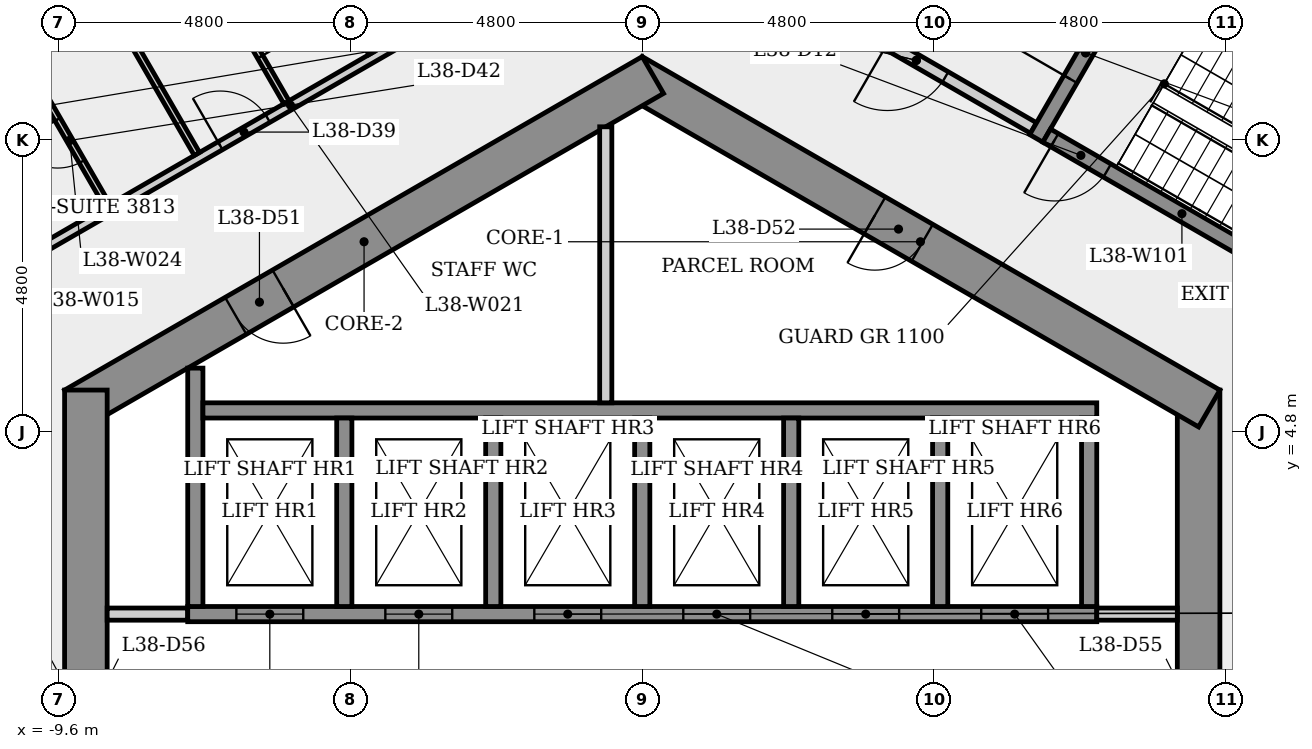
"""IFC4 building model, lengths in metres.
Left out: names, types, materials, properties, quantities, classifications, styles, units other than length and angle.
Written with IfcOpenShell. Run it as: python <this file> out.ifc"""

import sys

from ifc_helpers import new_model, si_unit, direction, frame, frame_2d, origin, place, context, subcontext, project, spatial, rectangle, extrude, element, fill, save


model = new_model("IFC4")
c1 = context("Model", 3, precision=1e-05, world=origin(), true_north=direction((0.0, 1.0)))
c2 = subcontext(c1, "Body", "Model", "MODEL_VIEW")
j1 = project(units=[si_unit("LENGTHUNIT", "METRE"), si_unit("PLANEANGLEUNIT", "RADIAN")], contexts=[c1])
p1 = place(None, origin())
s1 = spatial("IfcSite", under=j1, at=p1, CompositionType="ELEMENT")
p2 = place(p1, origin())
s2 = spatial("IfcBuilding", under=s1, at=p2, CompositionType="ELEMENT")
p3 = place(p2, frame((0.0, 0.0, 143.9)))
s3 = spatial("IfcBuildingStorey", under=s2, at=p3, CompositionType="ELEMENT", Elevation=143.9)
p4 = place(p3, frame((9.15, -5.485, 0.0), z_axis=(0.0, 0.0, 1.0), x_axis=(0.0, 1.0, 0.0)))
e1 = element("IfcWall", 1, at=p4, inside=s3, PredefinedType="SHEAR", context=c2, shape_type="SweptSolid", body=[
    extrude(rectangle(XDim=10.97, YDim=0.7, at=frame_2d((5.485, 0.0))), origin(), (0.0, 0.0, 1.0), 4.0),
])
p5 = place(p4, frame((4.685, 0.0, 0.0)))
e2 = element("IfcOpeningElement", 2, at=p5, cuts=e1, PredefinedType="OPENING", context=c2, shape_type="SweptSolid", body=[
    extrude(rectangle(XDim=1.6, YDim=2.1, at=frame_2d((0.8, 1.05))), frame((0.0, 0.36, 0.0), z_axis=(0.0, -1.0, 0.0), x_axis=(1.0, 0.0, 0.0)), (0.0, 0.0, 1.0), 0.72),
])
p6 = place(p3, frame((9.325, 5.182, 0.0), z_axis=(0.0, 0.0, 1.0), x_axis=(-0.866023993627, 0.500002442456, 0.0)))
e3 = element("IfcWall", 3, at=p6, inside=s3, PredefinedType="SHEAR", context=c2, shape_type="SweptSolid", body=[
    extrude(rectangle(XDim=10.97, YDim=0.7, at=frame_2d((5.485, 0.0))), origin(), (0.0, 0.0, 1.0), 4.0),
])
p7 = place(p6, frame((5.451, 0.0, 0.0)))
e4 = element("IfcOpeningElement", 4, at=p7, cuts=e3, PredefinedType="OPENING", context=c2, shape_type="SweptSolid", body=[
    extrude(rectangle(XDim=0.9, YDim=2.1, at=frame_2d((0.45, 1.05))), frame((0.0, 0.36, 0.0), z_axis=(0.0, -1.0, 0.0), x_axis=(1.0, 0.0, 0.0)), (0.0, 0.0, 1.0), 0.72),
])
p8 = place(p3, frame((0.175, 10.667, 0.0), z_axis=(0.0, 0.0, 1.0), x_axis=(-0.866023993627, -0.500002442456, 0.0)))
e5 = element("IfcWall", 5, at=p8, inside=s3, PredefinedType="SHEAR", context=c2, shape_type="SweptSolid", body=[
    extrude(rectangle(XDim=10.97, YDim=0.7, at=frame_2d((5.485, 0.0))), origin(), (0.0, 0.0, 1.0), 4.0),
])
p9 = place(p8, frame((7.021, 0.0, 0.0)))
e6 = element("IfcOpeningElement", 6, at=p9, cuts=e5, PredefinedType="OPENING", context=c2, shape_type="SweptSolid", body=[
    extrude(rectangle(XDim=0.9, YDim=2.1, at=frame_2d((0.45, 1.05))), frame((0.0, 0.36, 0.0), z_axis=(0.0, -1.0, 0.0), x_axis=(1.0, 0.0, 0.0)), (0.0, 0.0, 1.0), 0.72),
])
p10 = place(p3, frame((-9.15, 5.485, 0.0), z_axis=(0.0, 0.0, 1.0), x_axis=(0.0, -1.0, 0.0)))
e7 = element("IfcWall", 7, at=p10, inside=s3, PredefinedType="SHEAR", context=c2, shape_type="SweptSolid", body=[
    extrude(rectangle(XDim=10.97, YDim=0.7, at=frame_2d((5.485, 0.0))), origin(), (0.0, 0.0, 1.0), 4.0),
])
p11 = place(p10, frame((4.685, 0.0, 0.0)))
e8 = element("IfcOpeningElement", 8, at=p11, cuts=e7, PredefinedType="OPENING", context=c2, shape_type="SweptSolid", body=[
    extrude(rectangle(XDim=1.6, YDim=2.1, at=frame_2d((0.8, 1.05))), frame((0.0, 0.36, 0.0), z_axis=(0.0, -1.0, 0.0), x_axis=(1.0, 0.0, 0.0)), (0.0, 0.0, 1.0), 0.72),
])
p12 = place(p3, frame((-10.094, 7.682, 0.0), z_axis=(0.0, 0.0, 1.0), x_axis=(0.866024204941, 0.500002076452, 0.0)))
e9 = element("IfcWall", 9, at=p12, inside=s3, PredefinedType="PARTITIONING", context=c2, shape_type="SweptSolid", body=[
    extrude(rectangle(XDim=9.951, YDim=0.15, at=frame_2d((4.976, 0.0))), origin(), (0.0, 0.0, 1.0), 3.6),
])
p13 = place(p12, frame((3.642, 0.0, 0.0)))
e10 = element("IfcOpeningElement", 10, at=p13, cuts=e9, PredefinedType="OPENING", context=c2, shape_type="SweptSolid", body=[
    extrude(rectangle(XDim=0.9, YDim=2.1, at=frame_2d((0.45, 1.05))), frame((0.0, 0.085, 0.0), z_axis=(0.0, -1.0, 0.0), x_axis=(1.0, 0.0, 0.0)), (0.0, 0.0, 1.0), 0.17),
])
p14 = place(p3, frame((-8.8, 1.8, 0.0), z_axis=(0.0, 0.0, 1.0), x_axis=(1.0, 0.0, 0.0)))
e11 = element("IfcWall", 11, at=p14, inside=s3, PredefinedType="PARTITIONING", context=c2, shape_type="SweptSolid", body=[
    extrude(rectangle(XDim=1.325, YDim=0.2, at=frame_2d((0.663, 0.0))), origin(), (0.0, 0.0, 1.0), 3.6),
])
p15 = place(p3, frame((-8.796, 8.518, 0.0), z_axis=(0.0, 0.0, 1.0), x_axis=(-0.500032699561, 0.866006523861, 0.0)))
e12 = element("IfcWall", 12, at=p15, inside=s3, PredefinedType="PARTITIONING", context=c2, shape_type="SweptSolid", body=[
    extrude(rectangle(XDim=2.475, YDim=0.1, at=frame_2d((1.237, 0.0))), origin(), (0.0, 0.0, 1.0), 3.6),
])
p16 = place(p15, frame((0.837, 0.0, 0.0)))
e13 = element("IfcOpeningElement", 13, at=p16, cuts=e12, PredefinedType="OPENING", context=c2, shape_type="SweptSolid", body=[
    extrude(rectangle(XDim=0.8, YDim=2.1, at=frame_2d((0.4, 1.05))), frame((0.0, 0.06, 0.0), z_axis=(0.0, -1.0, 0.0), x_axis=(1.0, 0.0, 0.0)), (0.0, 0.0, 1.0), 0.12),
])
p17 = place(p3, frame((-7.475, 1.8, 0.0), z_axis=(0.0, 0.0, 1.0), x_axis=(1.0, 0.0, 0.0)))
e14 = element("IfcWall", 14, at=p17, inside=s3, PredefinedType="SHEAR", context=c2, shape_type="SweptSolid", body=[
    extrude(rectangle(XDim=14.95, YDim=0.25, at=frame_2d((7.475, 0.0))), origin(), (0.0, 0.0, 1.0), 3.6),
])
p18 = place(p17, frame((0.8, 0.0, 0.0)))
e15 = element("IfcOpeningElement", 15, at=p18, cuts=e14, PredefinedType="OPENING", context=c2, shape_type="SweptSolid", body=[
    extrude(rectangle(XDim=1.1, YDim=2.1, at=frame_2d((0.55, 1.05))), frame((0.0, 0.135, 0.0), z_axis=(0.0, -1.0, 0.0), x_axis=(1.0, 0.0, 0.0)), (0.0, 0.0, 1.0), 0.27),
])
p19 = place(p17, frame((3.25, 0.0, 0.0)))
e16 = element("IfcOpeningElement", 16, at=p19, cuts=e14, PredefinedType="OPENING", context=c2, shape_type="SweptSolid", body=[
    extrude(rectangle(XDim=1.1, YDim=2.1, at=frame_2d((0.55, 1.05))), frame((0.0, 0.135, 0.0), z_axis=(0.0, -1.0, 0.0), x_axis=(1.0, 0.0, 0.0)), (0.0, 0.0, 1.0), 0.27),
])
p20 = place(p17, frame((5.7, 0.0, 0.0)))
e17 = element("IfcOpeningElement", 17, at=p20, cuts=e14, PredefinedType="OPENING", context=c2, shape_type="SweptSolid", body=[
    extrude(rectangle(XDim=1.1, YDim=2.1, at=frame_2d((0.55, 1.05))), frame((0.0, 0.135, 0.0), z_axis=(0.0, -1.0, 0.0), x_axis=(1.0, 0.0, 0.0)), (0.0, 0.0, 1.0), 0.27),
])
p21 = place(p17, frame((8.15, 0.0, 0.0)))
e18 = element("IfcOpeningElement", 18, at=p21, cuts=e14, PredefinedType="OPENING", context=c2, shape_type="SweptSolid", body=[
    extrude(rectangle(XDim=1.1, YDim=2.1, at=frame_2d((0.55, 1.05))), frame((0.0, 0.135, 0.0), z_axis=(0.0, -1.0, 0.0), x_axis=(1.0, 0.0, 0.0)), (0.0, 0.0, 1.0), 0.27),
])
p22 = place(p17, frame((10.6, 0.0, 0.0)))
e19 = element("IfcOpeningElement", 19, at=p22, cuts=e14, PredefinedType="OPENING", context=c2, shape_type="SweptSolid", body=[
    extrude(rectangle(XDim=1.1, YDim=2.1, at=frame_2d((0.55, 1.05))), frame((0.0, 0.135, 0.0), z_axis=(0.0, -1.0, 0.0), x_axis=(1.0, 0.0, 0.0)), (0.0, 0.0, 1.0), 0.27),
])
p23 = place(p17, frame((13.05, 0.0, 0.0)))
e20 = element("IfcOpeningElement", 20, at=p23, cuts=e14, PredefinedType="OPENING", context=c2, shape_type="SweptSolid", body=[
    extrude(rectangle(XDim=1.1, YDim=2.1, at=frame_2d((0.55, 1.05))), frame((0.0, 0.135, 0.0), z_axis=(0.0, -1.0, 0.0), x_axis=(1.0, 0.0, 0.0)), (0.0, 0.0, 1.0), 0.27),
])
p24 = place(p3, frame((-7.35, 1.925, 0.0), z_axis=(0.0, 0.0, 1.0), x_axis=(0.0, 1.0, 0.0)))
e21 = element("IfcWall", 21, at=p24, inside=s3, PredefinedType="SHEAR", context=c2, shape_type="SweptSolid", body=[
    extrude(rectangle(XDim=3.921, YDim=0.25, at=frame_2d((1.96, 0.0))), origin(), (0.0, 0.0, 1.0), 3.6),
])
p25 = place(p3, frame((-7.225, 5.15, 0.0), z_axis=(0.0, 0.0, 1.0), x_axis=(1.0, 0.0, 0.0)))
e22 = element("IfcWall", 22, at=p25, inside=s3, PredefinedType="SHEAR", context=c2, shape_type="SweptSolid", body=[
    extrude(rectangle(XDim=14.7, YDim=0.25, at=frame_2d((7.35, 0.0))), origin(), (0.0, 0.0, 1.0), 3.6),
])
p26 = place(p3, frame((-7.324, 9.368, 0.0), z_axis=(0.0, 0.0, 1.0), x_axis=(-0.500021201058, 0.866013163002, 0.0)))
e23 = element("IfcWall", 23, at=p26, inside=s3, PredefinedType="PARTITIONING", context=c2, shape_type="SweptSolid", body=[
    extrude(rectangle(XDim=7.711, YDim=0.1, at=frame_2d((3.855, 0.0))), origin(), (0.0, 0.0, 1.0), 3.6),
])
p27 = place(p3, frame((-7.139, 12.448, 0.0), z_axis=(0.0, 0.0, 1.0), x_axis=(0.500034319456, -0.866005588531, 0.0)))
e24 = element("IfcWall", 24, at=p27, inside=s3, PredefinedType="PARTITIONING", context=c2, shape_type="SweptSolid", body=[
    extrude(rectangle(XDim=2.575, YDim=0.1, at=frame_2d((1.288, 0.0))), origin(), (0.0, 0.0, 1.0), 3.6),
])
p28 = place(p27, frame((0.913, 0.0, 0.0)))
e25 = element("IfcOpeningElement", 25, at=p28, cuts=e24, PredefinedType="OPENING", context=c2, shape_type="SweptSolid", body=[
    extrude(rectangle(XDim=0.8, YDim=2.1, at=frame_2d((0.4, 1.05))), frame((0.0, 0.06, 0.0), z_axis=(0.0, -1.0, 0.0), x_axis=(1.0, 0.0, 0.0)), (0.0, 0.0, 1.0), 0.12),
])
p29 = place(p3, frame((-4.9, 5.025, 0.0), z_axis=(0.0, 0.0, 1.0), x_axis=(0.0, -1.0, 0.0)))
e26 = element("IfcWall", 26, at=p29, inside=s3, PredefinedType="SHEAR", context=c2, shape_type="SweptSolid", body=[
    extrude(rectangle(XDim=3.1, YDim=0.25, at=frame_2d((1.55, 0.0))), origin(), (0.0, 0.0, 1.0), 4.0),
])
p30 = place(p3, frame((-4.451, 11.027, 0.0), z_axis=(0.0, 0.0, 1.0), x_axis=(-0.499983743644, 0.866034789193, 0.0)))
e27 = element("IfcWall", 27, at=p30, inside=s3, PredefinedType="PARTITIONING", context=c2, shape_type="SweptSolid", body=[
    extrude(rectangle(XDim=7.711, YDim=0.1, at=frame_2d((3.855, 0.0))), origin(), (0.0, 0.0, 1.0), 3.6),
])
p31 = place(p3, frame((-2.45, 5.025, 0.0), z_axis=(0.0, 0.0, 1.0), x_axis=(0.0, -1.0, 0.0)))
e28 = element("IfcWall", 28, at=p31, inside=s3, PredefinedType="SHEAR", context=c2, shape_type="SweptSolid", body=[
    extrude(rectangle(XDim=3.1, YDim=0.25, at=frame_2d((1.55, 0.0))), origin(), (0.0, 0.0, 1.0), 4.0),
])
p32 = place(p3, frame((-0.6, 9.815, 0.0), z_axis=(0.0, 0.0, 1.0), x_axis=(0.0, -1.0, 0.0)))
e29 = element("IfcWall", 29, at=p32, inside=s3, PredefinedType="PARTITIONING", context=c2, shape_type="SweptSolid", body=[
    extrude(rectangle(XDim=4.54, YDim=0.2, at=frame_2d((2.27, 0.0))), origin(), (0.0, 0.0, 1.0), 3.6),
])
for number, where, z_axis, x_axis in (
    (30, (0.0, 5.025, 0.0), (0.0, 0.0, 1.0), (0.0, -1.0, 0.0)),
    (31, (2.45, 5.025, 0.0), (0.0, 0.0, 1.0), (0.0, -1.0, 0.0)),
    (32, (4.9, 5.025, 0.0), (0.0, 0.0, 1.0), (0.0, -1.0, 0.0)),
):
    element("IfcWall", number, at=place(p3, frame(where, z_axis=z_axis, x_axis=x_axis)), inside=s3, PredefinedType="SHEAR", context=c2, shape_type="SweptSolid", body=[
        extrude(rectangle(XDim=3.1, YDim=0.25, at=frame_2d((1.55, 0.0))), origin(), (0.0, 0.0, 1.0), 4.0),
    ])
p33 = place(p3, frame((6.435, 9.795, 0.0), z_axis=(0.0, 0.0, 1.0), x_axis=(-0.866012907634, 0.500021643343, 0.0)))
e33 = element("IfcWall", 33, at=p33, inside=s3, PredefinedType="PARTITIONING", context=c2, shape_type="SweptSolid", body=[
    extrude(rectangle(XDim=4.45, YDim=0.2, at=frame_2d((2.225, 0.0))), origin(), (0.0, 0.0, 1.0), 3.6),
])
p34 = place(p33, frame((1.675, 0.0, 0.0)))
e34 = element("IfcOpeningElement", 34, at=p34, cuts=e33, PredefinedType="OPENING", context=c2, shape_type="SweptSolid", body=[
    extrude(rectangle(XDim=1.1, YDim=2.1, at=frame_2d((0.55, 1.05))), frame((0.0, 0.11, 0.0), z_axis=(0.0, -1.0, 0.0), x_axis=(1.0, 0.0, 0.0)), (0.0, 0.0, 1.0), 0.22),
])
p35 = place(p3, frame((6.48, 9.624, 0.0), z_axis=(0.0, 0.0, 1.0), x_axis=(0.500017246033, 0.866015446554, 0.0)))
e35 = element("IfcWall", 35, at=p35, inside=s3, PredefinedType="SHEAR", context=c2, shape_type="SweptSolid", body=[
    extrude(rectangle(XDim=3.25, YDim=0.25, at=frame_2d((1.625, 0.0))), origin(), (0.0, 0.0, 1.0), 3.6),
])
p36 = place(p35, frame((1.125, 0.0, 0.0)))
e36 = element("IfcOpeningElement", 36, at=p36, cuts=e35, PredefinedType="OPENING", context=c2, shape_type="SweptSolid", body=[
    extrude(rectangle(XDim=1.0, YDim=2.1, at=frame_2d((0.5, 1.05))), frame((0.0, 0.135, 0.0), z_axis=(0.0, -1.0, 0.0), x_axis=(1.0, 0.0, 0.0)), (0.0, 0.0, 1.0), 0.27),
])
p37 = place(p3, frame((7.475, 1.8, 0.0), z_axis=(0.0, 0.0, 1.0), x_axis=(1.0, 0.0, 0.0)))
e37 = element("IfcWall", 37, at=p37, inside=s3, PredefinedType="PARTITIONING", context=c2, shape_type="SweptSolid", body=[
    extrude(rectangle(XDim=1.325, YDim=0.2, at=frame_2d((0.663, 0.0))), origin(), (0.0, 0.0, 1.0), 3.6),
])
p38 = place(p3, frame((7.35, 5.025, 0.0), z_axis=(0.0, 0.0, 1.0), x_axis=(0.0, -1.0, 0.0)))
e38 = element("IfcWall", 38, at=p38, inside=s3, PredefinedType="SHEAR", context=c2, shape_type="SweptSolid", body=[
    extrude(rectangle(XDim=3.1, YDim=0.25, at=frame_2d((1.55, 0.0))), origin(), (0.0, 0.0, 1.0), 4.0),
])
p39 = place(p3, frame((8.151, 12.268, 0.0), z_axis=(0.0, 0.0, 1.0), x_axis=(0.866025499775, -0.499999833739, 0.0)))
e39 = element("IfcWall", 39, at=p39, inside=s3, PredefinedType="SHEAR", context=c2, shape_type="SweptSolid", body=[
    extrude(rectangle(XDim=6.4, YDim=0.25, at=frame_2d((3.2, 0.0))), origin(), (0.0, 0.0, 1.0), 3.6),
])
p40 = place(p3, frame((11.1, 7.101, 0.0), z_axis=(0.0, 0.0, 1.0), x_axis=(-0.8660265141, 0.499998076872, 0.0)))
e40 = element("IfcWall", 40, at=p40, inside=s3, PredefinedType="SHEAR", context=c2, shape_type="SweptSolid", body=[
    extrude(rectangle(XDim=5.137, YDim=0.25, at=frame_2d((2.569, 0.0))), origin(), (0.0, 0.0, 1.0), 3.6),
])
p41 = place(p40, frame((3.987, 0.0, 0.0)))
e41 = element("IfcOpeningElement", 41, at=p41, cuts=e40, PredefinedType="OPENING", context=c2, shape_type="SweptSolid", body=[
    extrude(rectangle(XDim=1.0, YDim=2.1, at=frame_2d((0.5, 1.05))), frame((0.0, 0.135, 0.0), z_axis=(0.0, -1.0, 0.0), x_axis=(1.0, 0.0, 0.0)), (0.0, 0.0, 1.0), 0.27),
])
p42 = place(p18, origin())
e42 = element("IfcDoor", 42, at=p42, inside=s3, OperationType="SLIDING_TO_LEFT", PredefinedType="DOOR", context=c2, shape_type="SweptSolid", body=[
    extrude(rectangle(XDim=1.1, YDim=2.1, at=frame_2d((0.55, 1.05))), frame((0.0, 0.025, 0.0), z_axis=(0.0, -1.0, 0.0), x_axis=(1.0, 0.0, 0.0)), (0.0, 0.0, 1.0), 0.05),
])
fill(e15, e42)
p43 = place(p19, origin())
e43 = element("IfcDoor", 43, at=p43, inside=s3, OperationType="SLIDING_TO_LEFT", PredefinedType="DOOR", context=c2, shape_type="SweptSolid", body=[
    extrude(rectangle(XDim=1.1, YDim=2.1, at=frame_2d((0.55, 1.05))), frame((0.0, 0.025, 0.0), z_axis=(0.0, -1.0, 0.0), x_axis=(1.0, 0.0, 0.0)), (0.0, 0.0, 1.0), 0.05),
])
fill(e16, e43)
p44 = place(p20, origin())
e44 = element("IfcDoor", 44, at=p44, inside=s3, OperationType="SLIDING_TO_LEFT", PredefinedType="DOOR", context=c2, shape_type="SweptSolid", body=[
    extrude(rectangle(XDim=1.1, YDim=2.1, at=frame_2d((0.55, 1.05))), frame((0.0, 0.025, 0.0), z_axis=(0.0, -1.0, 0.0), x_axis=(1.0, 0.0, 0.0)), (0.0, 0.0, 1.0), 0.05),
])
fill(e17, e44)
p45 = place(p21, origin())
e45 = element("IfcDoor", 45, at=p45, inside=s3, OperationType="SLIDING_TO_LEFT", PredefinedType="DOOR", context=c2, shape_type="SweptSolid", body=[
    extrude(rectangle(XDim=1.1, YDim=2.1, at=frame_2d((0.55, 1.05))), frame((0.0, 0.025, 0.0), z_axis=(0.0, -1.0, 0.0), x_axis=(1.0, 0.0, 0.0)), (0.0, 0.0, 1.0), 0.05),
])
fill(e18, e45)
p46 = place(p22, origin())
e46 = element("IfcDoor", 46, at=p46, inside=s3, OperationType="SLIDING_TO_LEFT", PredefinedType="DOOR", context=c2, shape_type="SweptSolid", body=[
    extrude(rectangle(XDim=1.1, YDim=2.1, at=frame_2d((0.55, 1.05))), frame((0.0, 0.025, 0.0), z_axis=(0.0, -1.0, 0.0), x_axis=(1.0, 0.0, 0.0)), (0.0, 0.0, 1.0), 0.05),
])
fill(e19, e46)
p47 = place(p23, origin())
e47 = element("IfcDoor", 47, at=p47, inside=s3, OperationType="SLIDING_TO_LEFT", PredefinedType="DOOR", context=c2, shape_type="SweptSolid", body=[
    extrude(rectangle(XDim=1.1, YDim=2.1, at=frame_2d((0.55, 1.05))), frame((0.0, 0.025, 0.0), z_axis=(0.0, -1.0, 0.0), x_axis=(1.0, 0.0, 0.0)), (0.0, 0.0, 1.0), 0.05),
])
fill(e20, e47)
p48 = place(p41, origin())
e48 = element("IfcDoor", 48, at=p48, inside=s3, OperationType="SINGLE_SWING_RIGHT", PredefinedType="DOOR", context=c2, shape_type="SweptSolid", body=[
    extrude(rectangle(XDim=1.0, YDim=2.1, at=frame_2d((0.5, 1.05))), frame((0.0, 0.025, 0.0), z_axis=(0.0, -1.0, 0.0), x_axis=(1.0, 0.0, 0.0)), (0.0, 0.0, 1.0), 0.05),
])
fill(e41, e48)
p49 = place(p36, origin())
e49 = element("IfcDoor", 49, at=p49, inside=s3, OperationType="SINGLE_SWING_LEFT", PredefinedType="DOOR", context=c2, shape_type="SweptSolid", body=[
    extrude(rectangle(XDim=1.0, YDim=2.1, at=frame_2d((0.5, 1.05))), frame((0.0, 0.025, 0.0), z_axis=(0.0, -1.0, 0.0), x_axis=(1.0, 0.0, 0.0)), (0.0, 0.0, 1.0), 0.05),
])
fill(e36, e49)
p50 = place(p34, origin())
e50 = element("IfcDoor", 50, at=p50, inside=s3, OperationType="SINGLE_SWING_RIGHT", PredefinedType="DOOR", context=c2, shape_type="SweptSolid", body=[
    extrude(rectangle(XDim=1.1, YDim=2.1, at=frame_2d((0.55, 1.05))), frame((0.0, 0.025, 0.0), z_axis=(0.0, -1.0, 0.0), x_axis=(1.0, 0.0, 0.0)), (0.0, 0.0, 1.0), 0.05),
])
fill(e34, e50)
p51 = place(p13, origin())
e51 = element("IfcDoor", 51, at=p51, inside=s3, OperationType="SINGLE_SWING_LEFT", PredefinedType="DOOR", context=c2, shape_type="SweptSolid", body=[
    extrude(rectangle(XDim=0.9, YDim=2.1, at=frame_2d((0.45, 1.05))), frame((0.0, 0.025, 0.0), z_axis=(0.0, -1.0, 0.0), x_axis=(1.0, 0.0, 0.0)), (0.0, 0.0, 1.0), 0.05),
])
fill(e10, e51)
p52 = place(p28, origin())
e52 = element("IfcDoor", 52, at=p52, inside=s3, OperationType="SINGLE_SWING_RIGHT", PredefinedType="DOOR", context=c2, shape_type="SweptSolid", body=[
    extrude(rectangle(XDim=0.8, YDim=2.1, at=frame_2d((0.4, 1.05))), frame((0.0, 0.025, 0.0), z_axis=(0.0, -1.0, 0.0), x_axis=(1.0, 0.0, 0.0)), (0.0, 0.0, 1.0), 0.05),
])
fill(e25, e52)
p53 = place(p16, origin())
e53 = element("IfcDoor", 53, at=p53, inside=s3, OperationType="SINGLE_SWING_RIGHT", PredefinedType="DOOR", context=c2, shape_type="SweptSolid", body=[
    extrude(rectangle(XDim=0.8, YDim=2.1, at=frame_2d((0.4, 1.05))), frame((0.0, 0.025, 0.0), z_axis=(0.0, -1.0, 0.0), x_axis=(1.0, 0.0, 0.0)), (0.0, 0.0, 1.0), 0.05),
])
fill(e13, e53)
p54 = place(p9, origin())
e54 = element("IfcDoor", 54, at=p54, inside=s3, OperationType="SINGLE_SWING_LEFT", PredefinedType="DOOR", context=c2, shape_type="SweptSolid", body=[
    extrude(rectangle(XDim=0.9, YDim=2.1, at=frame_2d((0.45, 1.05))), frame((0.0, 0.025, 0.0), z_axis=(0.0, -1.0, 0.0), x_axis=(1.0, 0.0, 0.0)), (0.0, 0.0, 1.0), 0.05),
])
fill(e6, e54)
p55 = place(p7, origin())
e55 = element("IfcDoor", 55, at=p55, inside=s3, OperationType="SINGLE_SWING_RIGHT", PredefinedType="DOOR", context=c2, shape_type="SweptSolid", body=[
    extrude(rectangle(XDim=0.9, YDim=2.1, at=frame_2d((0.45, 1.05))), frame((0.0, 0.025, 0.0), z_axis=(0.0, -1.0, 0.0), x_axis=(1.0, 0.0, 0.0)), (0.0, 0.0, 1.0), 0.05),
])
fill(e4, e55)
save(model, sys.argv[1])
